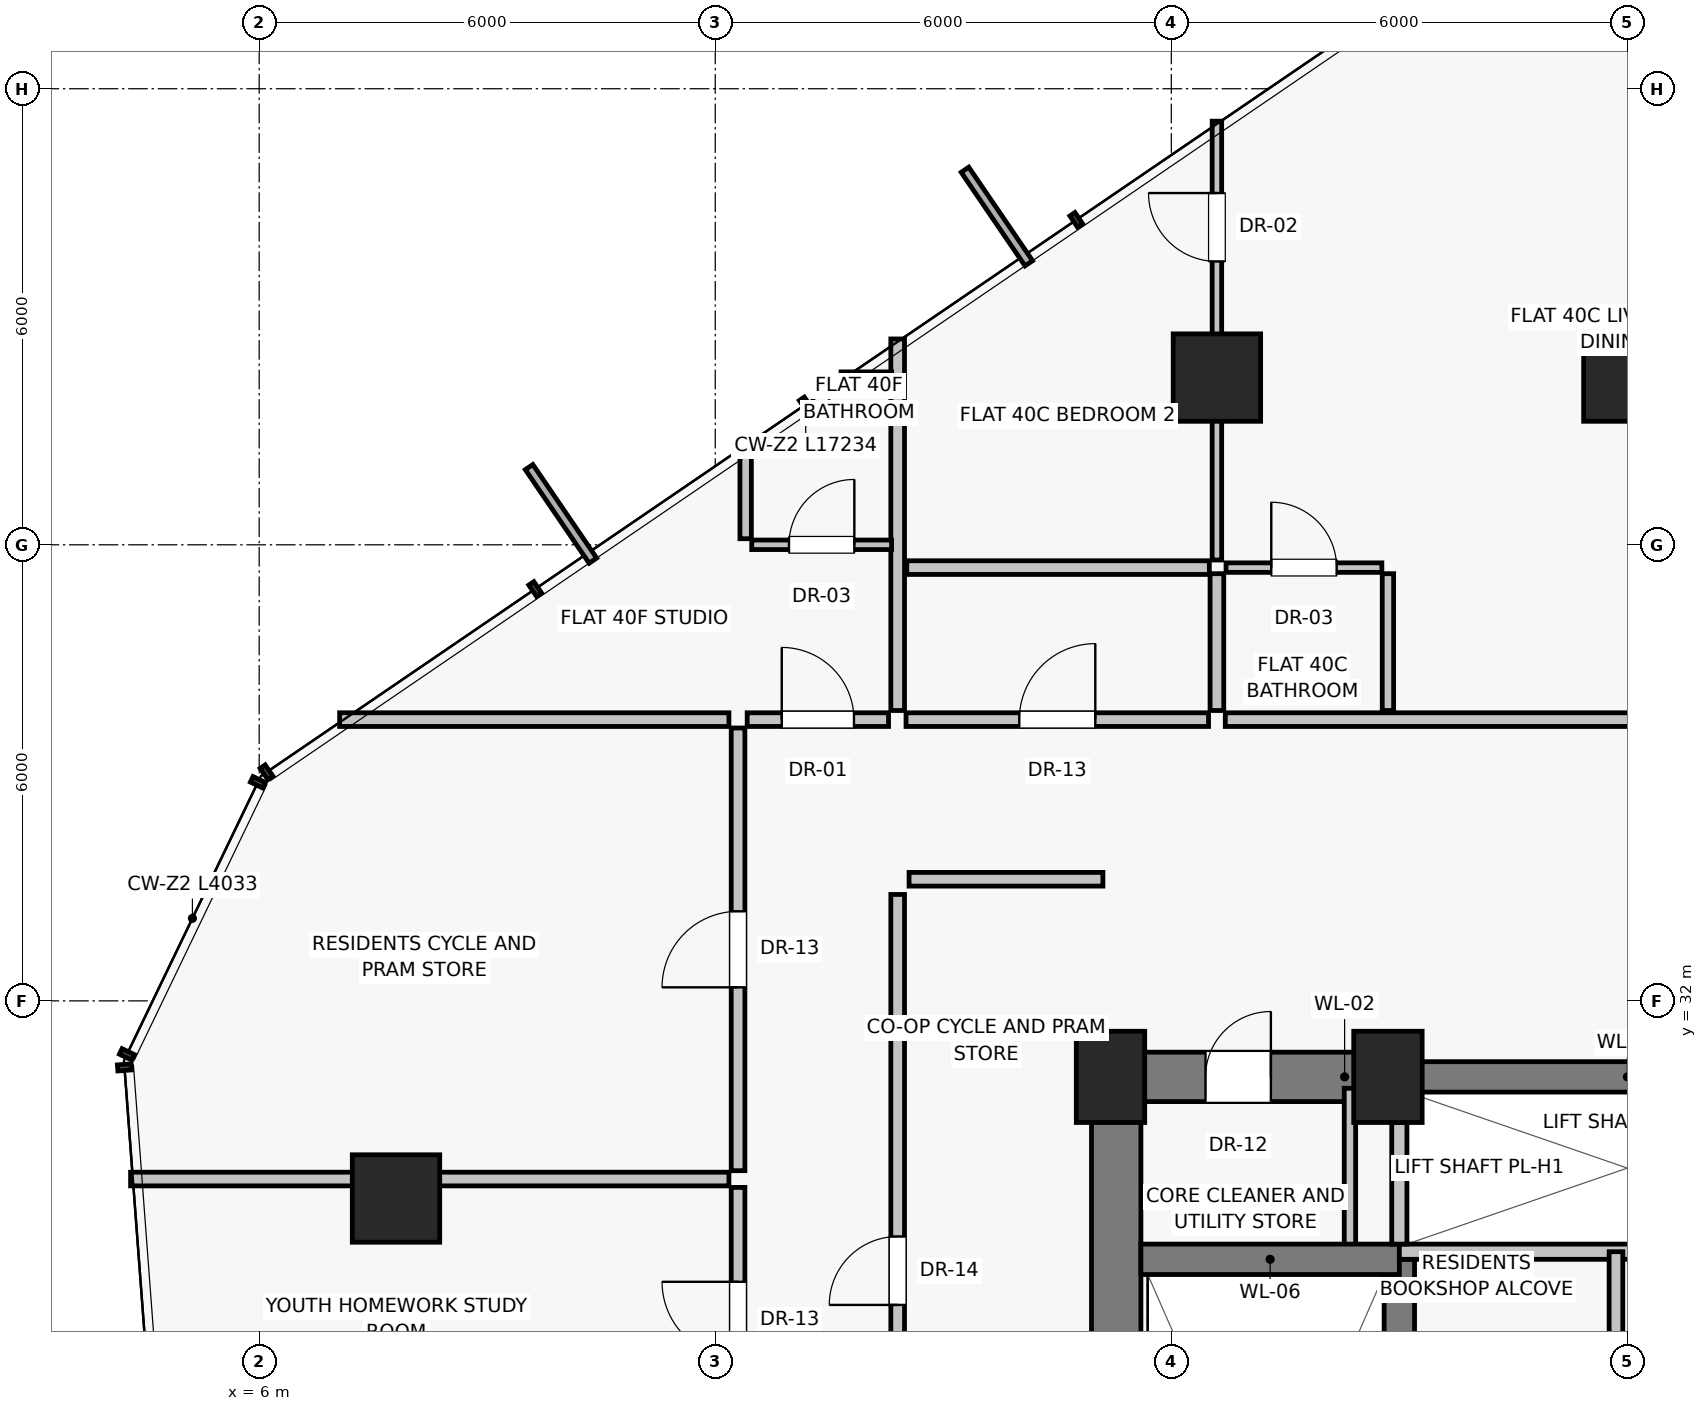
"""IFC4 building model, lengths in metres.
Left out: names, types, materials, properties, quantities, classifications, styles, units other than length and angle.
Written with IfcOpenShell. Run it as: python <this file> out.ifc"""

import sys

from ifc_helpers import new_model, si_unit, direction, frame, frame_2d, origin, origin_2d, place, context, subcontext, project, spatial, rectangle, extrude, source, transform, mapped, element, fill, save


model = new_model("IFC4")
c1 = context("Model", 3, precision=1e-05, world=origin(), true_north=direction((0.0, 1.0)))
c2 = subcontext(c1, "Body", "Model", "MODEL_VIEW")
j1 = project(units=[si_unit("LENGTHUNIT", "METRE"), si_unit("PLANEANGLEUNIT", "RADIAN")], contexts=[c1])
p1 = place(None, origin())
s1 = spatial("IfcSite", under=j1, at=p1, CompositionType="ELEMENT")
p2 = place(p1, origin())
s2 = spatial("IfcBuilding", under=s1, at=p2, CompositionType="ELEMENT")
p3 = place(p2, frame((0.0, 0.0, 142.5)))
s3 = spatial("IfcBuildingStorey", under=s2, at=p3, CompositionType="ELEMENT", Elevation=142.5)
for number, where, z_axis, x_axis in (
    (1, (17.2, 31.0, 0.0), (0.0, 0.0, 1.0), (1.0, 0.0, 0.0)),
    (2, (20.85, 31.0, 0.0), (0.0, 0.0, 1.0), (1.0, 0.0, 0.0)),
):
    element("IfcColumn", number, at=place(p3, frame(where, z_axis=z_axis, x_axis=x_axis)), inside=s3, PredefinedType="PILASTER", context=c2, shape_type="SweptSolid", body=[
        extrude(rectangle(XDim=0.9, YDim=1.2, at=origin_2d()), origin(), (0.0, 0.0, 1.0), 3.25),
    ])
for number, where, z_axis, x_axis in (
    (3, (24.0, 40.2, 0.0), (0.0, 0.0, 1.0), (1.0, 0.0, 0.0)),
    (4, (18.6, 40.2, 0.0), (0.0, 0.0, 1.0), (1.0, 0.0, 0.0)),
    (5, (7.8, 29.4, 0.0), (0.0, 0.0, 1.0), (1.0, 0.0, 0.0)),
):
    element("IfcColumn", number, at=place(p3, frame(where, z_axis=z_axis, x_axis=x_axis)), inside=s3, PredefinedType="COLUMN", context=c2, shape_type="SweptSolid", body=[
        extrude(rectangle(XDim=1.15, YDim=1.15, at=origin_2d()), origin(), (0.0, 0.0, 1.0), 3.25),
    ])
p4 = place(p3, frame((17.275, 16.8, 0.0), z_axis=(0.0, 0.0, 1.0), x_axis=(0.0, 1.0, 0.0)))
e6 = element("IfcWall", 6, at=p4, inside=s3, PredefinedType="SHEAR", context=c2, shape_type="SweptSolid", body=[
    extrude(rectangle(XDim=14.2, YDim=0.65, at=frame_2d((7.1, 0.0))), origin(), (0.0, 0.0, 1.0), 3.0),
])
p5 = place(p3, frame((17.2, 31.0, 0.0), z_axis=(0.0, 0.0, 1.0), x_axis=(1.0, 0.0, 0.0)))
e7 = element("IfcWall", 7, at=p5, inside=s3, PredefinedType="SHEAR", context=c2, shape_type="SweptSolid", body=[
    extrude(rectangle(XDim=3.8, YDim=0.65, at=frame_2d((1.9, 0.0))), origin(), (0.0, 0.0, 1.0), 3.0),
])
p6 = place(p5, frame((1.25, 0.0, 0.0)))
e8 = element("IfcOpeningElement", 8, at=p6, cuts=e7, PredefinedType="OPENING", context=c2, shape_type="SweptSolid", body=[
    extrude(rectangle(XDim=0.86, YDim=2.01, at=frame_2d((0.43, 1.005))), frame((0.0, 0.335, 0.0), z_axis=(0.0, -1.0, 0.0), x_axis=(1.0, 0.0, 0.0)), (0.0, 0.0, 1.0), 0.67),
])
p7 = place(p3, frame((21.0, 31.0, 0.0), z_axis=(0.0, 0.0, 1.0), x_axis=(1.0, 0.0, 0.0)))
e9 = element("IfcWall", 9, at=p7, inside=s3, PredefinedType="SHEAR", context=c2, shape_type="SweptSolid", body=[
    extrude(rectangle(XDim=6.0, YDim=0.4, at=frame_2d((3.0, 0.0))), origin(), (0.0, 0.0, 1.0), 3.0),
])
p8 = place(p3, frame((20.35, 28.65, 0.0), z_axis=(0.0, 0.0, 1.0), x_axis=(0.0, 1.0, 0.0)))
e10 = element("IfcWall", 10, at=p8, inside=s3, PredefinedType="PARTITIONING", context=c2, shape_type="SweptSolid", body=[
    extrude(rectangle(XDim=2.2, YDim=0.15, at=frame_2d((1.1, 0.0))), origin(), (0.0, 0.0, 1.0), 3.0),
])
p9 = place(p3, frame((21.0, 19.8, 0.0), z_axis=(0.0, 0.0, 1.0), x_axis=(0.0, 1.0, 0.0)))
e11 = element("IfcWall", 11, at=p9, inside=s3, PredefinedType="SHEAR", context=c2, shape_type="SweptSolid", body=[
    extrude(rectangle(XDim=8.8, YDim=0.4, at=frame_2d((4.4, 0.0))), origin(), (0.0, 0.0, 1.0), 3.0),
])
p10 = place(p3, frame((17.6, 28.6, 0.0), z_axis=(0.0, 0.0, 1.0), x_axis=(1.0, 0.0, 0.0)))
e12 = element("IfcWall", 12, at=p10, inside=s3, PredefinedType="SHEAR", context=c2, shape_type="SweptSolid", body=[
    extrude(rectangle(XDim=3.4, YDim=0.4, at=frame_2d((1.7, 0.0))), origin(), (0.0, 0.0, 1.0), 3.0),
])
p11 = place(p3, frame((21.0, 28.7, 0.0), z_axis=(0.0, 0.0, 1.0), x_axis=(1.0, 0.0, 0.0)))
e13 = element("IfcWall", 13, at=p11, inside=s3, PredefinedType="SOLIDWALL", context=c2, shape_type="SweptSolid", body=[
    extrude(rectangle(XDim=6.0, YDim=0.2, at=frame_2d((3.0, 0.0))), origin(), (0.0, 0.0, 1.0), 3.0),
])
p12 = place(p3, frame((21.0, 28.8, 0.0), z_axis=(0.0, 0.0, 1.0), x_axis=(0.0, 1.0, 0.0)))
e14 = element("IfcWall", 14, at=p12, inside=s3, PredefinedType="SOLIDWALL", context=c2, shape_type="SweptSolid", body=[
    extrude(rectangle(XDim=1.6, YDim=0.2, at=frame_2d((0.8, 0.0))), origin(), (0.0, 0.0, 1.0), 3.0),
])
p13 = place(p3, frame((23.85, 25.62, 0.0), z_axis=(0.0, 0.0, 1.0), x_axis=(0.0, 1.0, 0.0)))
e15 = element("IfcWall", 15, at=p13, inside=s3, PredefinedType="PARTITIONING", context=c2, shape_type="SweptSolid", body=[
    extrude(rectangle(XDim=3.08, YDim=0.18, at=frame_2d((1.54, 0.0))), origin(), (0.0, 0.0, 1.0), 3.0),
])
p14 = place(p13, frame((0.9, 0.0, 0.0)))
e16 = element("IfcOpeningElement", 16, at=p14, cuts=e15, PredefinedType="OPENING", context=c2, shape_type="SweptSolid", body=[
    extrude(rectangle(XDim=0.9, YDim=2.01, at=frame_2d((0.45, 1.005))), frame((0.0, 0.1, 0.0), z_axis=(0.0, -1.0, 0.0), x_axis=(1.0, 0.0, 0.0)), (0.0, 0.0, 1.0), 0.2),
])
p15 = place(p3, frame((14.4, 24.2, 0.0), z_axis=(0.0, 0.0, 1.0), x_axis=(0.0, 1.0, 0.0)))
e17 = element("IfcWall", 17, at=p15, inside=s3, PredefinedType="PARTITIONING", context=c2, shape_type="SweptSolid", body=[
    extrude(rectangle(XDim=9.2, YDim=0.18, at=frame_2d((4.6, 0.0))), origin(), (0.0, 0.0, 1.0), 3.0),
])
p16 = place(p15, frame((3.8, 0.0, 0.0)))
e18 = element("IfcOpeningElement", 18, at=p16, cuts=e17, PredefinedType="OPENING", context=c2, shape_type="SweptSolid", body=[
    extrude(rectangle(XDim=0.9, YDim=2.01, at=frame_2d((0.45, 1.005))), frame((0.0, 0.1, 0.0), z_axis=(0.0, -1.0, 0.0), x_axis=(1.0, 0.0, 0.0)), (0.0, 0.0, 1.0), 0.2),
])
p17 = place(p3, frame((14.55, 33.6, 0.0), z_axis=(0.0, 0.0, 1.0), x_axis=(1.0, 0.0, 0.0)))
e19 = element("IfcWall", 19, at=p17, inside=s3, PredefinedType="PARTITIONING", context=c2, shape_type="SweptSolid", body=[
    extrude(rectangle(XDim=2.55, YDim=0.18, at=frame_2d((1.275, 0.0))), origin(), (0.0, 0.0, 1.0), 3.0),
])
p18 = place(p3, frame((14.4, 35.82, 0.0), z_axis=(0.0, 0.0, 1.0), x_axis=(0.0, 1.0, 0.0)))
e20 = element("IfcWall", 20, at=p18, inside=s3, PredefinedType="PARTITIONING", context=c2, shape_type="SweptSolid", body=[
    extrude(rectangle(XDim=4.888, YDim=0.18, at=frame_2d((2.444, 0.0))), origin(), (0.0, 0.0, 1.0), 3.0),
])
p19 = place(p3, frame((14.51, 35.7, 0.0), z_axis=(0.0, 0.0, 1.0), x_axis=(1.0, 0.0, 0.0)))
e21 = element("IfcWall", 21, at=p19, inside=s3, PredefinedType="PARTITIONING", context=c2, shape_type="SweptSolid", body=[
    extrude(rectangle(XDim=3.98, YDim=0.18, at=frame_2d((1.99, 0.0))), origin(), (0.0, 0.0, 1.0), 2.58),
])
p20 = place(p19, frame((1.49, 0.0, 0.0)))
e22 = element("IfcOpeningElement", 22, at=p20, cuts=e21, PredefinedType="OPENING", context=c2, shape_type="SweptSolid", body=[
    extrude(rectangle(XDim=1.0, YDim=2.01, at=frame_2d((0.5, 1.005))), frame((0.0, 0.1, 0.0), z_axis=(0.0, -1.0, 0.0), x_axis=(1.0, 0.0, 0.0)), (0.0, 0.0, 1.0), 0.2),
])
p21 = place(p3, frame((18.71, 35.7, 0.0), z_axis=(0.0, 0.0, 1.0), x_axis=(1.0, 0.0, 0.0)))
e23 = element("IfcWall", 23, at=p21, inside=s3, PredefinedType="PARTITIONING", context=c2, shape_type="SweptSolid", body=[
    extrude(rectangle(XDim=14.78, YDim=0.18, at=frame_2d((7.39, 0.0))), origin(), (0.0, 0.0, 1.0), 2.58),
])
p22 = place(p21, frame((5.94, 0.0, 0.0)))
e24 = element("IfcOpeningElement", 24, at=p22, cuts=e23, PredefinedType="OPENING", context=c2, shape_type="SweptSolid", body=[
    extrude(rectangle(XDim=0.95, YDim=2.02, at=frame_2d((0.475, 1.01))), frame((0.0, 0.1, 0.0), z_axis=(0.0, -1.0, 0.0), x_axis=(1.0, 0.0, 0.0)), (0.0, 0.0, 1.0), 0.2),
])
p23 = place(p3, frame((14.52, 37.7, 0.0), z_axis=(0.0, 0.0, 1.0), x_axis=(1.0, 0.0, 0.0)))
e25 = element("IfcWall", 25, at=p23, inside=s3, PredefinedType="PARTITIONING", context=c2, shape_type="SweptSolid", body=[
    extrude(rectangle(XDim=3.98, YDim=0.18, at=frame_2d((1.99, 0.0))), origin(), (0.0, 0.0, 1.0), 3.0),
])
p24 = place(p3, frame((18.6, 35.82, 0.0), z_axis=(0.0, 0.0, 1.0), x_axis=(0.0, 1.0, 0.0)))
e26 = element("IfcWall", 26, at=p24, inside=s3, PredefinedType="PARTITIONING", context=c2, shape_type="SweptSolid", body=[
    extrude(rectangle(XDim=1.8, YDim=0.18, at=frame_2d((0.9, 0.0))), origin(), (0.0, 0.0, 1.0), 2.378),
])
p25 = place(p3, frame((18.6, 37.8, 0.0), z_axis=(0.0, 0.0, 1.0), x_axis=(0.0, 1.0, 0.0)))
e27 = element("IfcWall", 27, at=p25, inside=s3, PredefinedType="PARTITIONING", context=c2, shape_type="SweptSolid", body=[
    extrude(rectangle(XDim=5.773, YDim=0.125, at=frame_2d((2.887, 0.0))), origin(), (0.0, 0.0, 1.0), 2.378),
])
p26 = place(p25, frame((3.928, 0.0, 0.0)))
e28 = element("IfcOpeningElement", 28, at=p26, cuts=e27, PredefinedType="OPENING", context=c2, shape_type="SweptSolid", body=[
    extrude(rectangle(XDim=0.9, YDim=2.01, at=frame_2d((0.45, 1.005))), frame((0.0, 0.073, 0.0), z_axis=(0.0, -1.0, 0.0), x_axis=(1.0, 0.0, 0.0)), (0.0, 0.0, 1.0), 0.145),
])
p27 = place(p3, frame((20.85, 35.82, 0.0), z_axis=(0.0, 0.0, 1.0), x_axis=(0.0, 1.0, 0.0)))
e29 = element("IfcWall", 29, at=p27, inside=s3, PredefinedType="PARTITIONING", context=c2, shape_type="SweptSolid", body=[
    extrude(rectangle(XDim=1.8, YDim=0.15, at=frame_2d((0.9, 0.0))), origin(), (0.0, 0.0, 1.0), 3.0),
])
p28 = place(p3, frame((18.72, 37.7, 0.0), z_axis=(0.0, 0.0, 1.0), x_axis=(1.0, 0.0, 0.0)))
e30 = element("IfcWall", 30, at=p28, inside=s3, PredefinedType="PARTITIONING", context=c2, shape_type="SweptSolid", body=[
    extrude(rectangle(XDim=2.05, YDim=0.125, at=frame_2d((1.025, 0.0))), origin(), (0.0, 0.0, 1.0), 3.0),
])
p29 = place(p28, frame((0.595, 0.0, 0.0)))
e31 = element("IfcOpeningElement", 31, at=p29, cuts=e30, PredefinedType="OPENING", context=c2, shape_type="SweptSolid", body=[
    extrude(rectangle(XDim=0.86, YDim=2.01, at=frame_2d((0.43, 1.005))), frame((0.0, 0.073, 0.0), z_axis=(0.0, -1.0, 0.0), x_axis=(1.0, 0.0, 0.0)), (0.0, 0.0, 1.0), 0.145),
])
p30 = place(p3, frame((12.18, 35.7, 0.0), z_axis=(0.0, 0.0, 1.0), x_axis=(-1.0, 0.0, 0.0)))
e32 = element("IfcWall", 32, at=p30, inside=s3, PredefinedType="PARTITIONING", context=c2, shape_type="SweptSolid", body=[
    extrude(rectangle(XDim=5.122, YDim=0.18, at=frame_2d((2.561, 0.0))), origin(), (0.0, 0.0, 1.0), 3.0),
])
p31 = place(p3, frame((12.3, 26.062, 0.0), z_axis=(0.0, 0.0, 1.0), x_axis=(0.0, 1.0, 0.0)))
e33 = element("IfcWall", 33, at=p31, inside=s3, PredefinedType="PARTITIONING", context=c2, shape_type="SweptSolid", body=[
    extrude(rectangle(XDim=3.484, YDim=0.18, at=frame_2d((1.742, 0.0))), origin(), (0.0, 0.0, 1.0), 2.58),
])
p32 = place(p31, frame((1.242, 0.0, 0.0)))
e34 = element("IfcOpeningElement", 34, at=p32, cuts=e33, PredefinedType="OPENING", context=c2, shape_type="SweptSolid", body=[
    extrude(rectangle(XDim=1.0, YDim=2.01, at=frame_2d((0.5, 1.005))), frame((0.0, 0.1, 0.0), z_axis=(0.0, -1.0, 0.0), x_axis=(1.0, 0.0, 0.0)), (0.0, 0.0, 1.0), 0.2),
])
p33 = place(p3, frame((12.3, 29.766, 0.0), z_axis=(0.0, 0.0, 1.0), x_axis=(0.0, 1.0, 0.0)))
e35 = element("IfcWall", 35, at=p33, inside=s3, PredefinedType="PARTITIONING", context=c2, shape_type="SweptSolid", body=[
    extrude(rectangle(XDim=5.824, YDim=0.18, at=frame_2d((2.912, 0.0))), origin(), (0.0, 0.0, 1.0), 2.58),
])
p34 = place(p33, frame((2.412, 0.0, 0.0)))
e36 = element("IfcOpeningElement", 36, at=p34, cuts=e35, PredefinedType="OPENING", context=c2, shape_type="SweptSolid", body=[
    extrude(rectangle(XDim=1.0, YDim=2.01, at=frame_2d((0.5, 1.005))), frame((0.0, 0.1, 0.0), z_axis=(0.0, -1.0, 0.0), x_axis=(1.0, 0.0, 0.0)), (0.0, 0.0, 1.0), 0.2),
])
p35 = place(p3, frame((12.18, 29.656, 0.0), z_axis=(0.0, 0.0, 1.0), x_axis=(-1.0, 0.0, 0.0)))
e37 = element("IfcWall", 37, at=p35, inside=s3, PredefinedType="PARTITIONING", context=c2, shape_type="SweptSolid", body=[
    extrude(rectangle(XDim=7.872, YDim=0.18, at=frame_2d((3.936, 0.0))), origin(), (0.0, 0.0, 1.0), 2.378),
])
p36 = place(p3, frame((12.42, 35.7, 0.0), z_axis=(0.0, 0.0, 1.0), x_axis=(1.0, 0.0, 0.0)))
e38 = element("IfcWall", 38, at=p36, inside=s3, PredefinedType="PARTITIONING", context=c2, shape_type="SweptSolid", body=[
    extrude(rectangle(XDim=1.86, YDim=0.18, at=frame_2d((0.93, 0.0))), origin(), (0.0, 0.0, 1.0), 3.0),
])
p37 = place(p36, frame((0.455, 0.0, 0.0)))
e39 = element("IfcOpeningElement", 39, at=p37, cuts=e38, PredefinedType="OPENING", context=c2, shape_type="SweptSolid", body=[
    extrude(rectangle(XDim=0.95, YDim=2.02, at=frame_2d((0.475, 1.01))), frame((0.0, 0.1, 0.0), z_axis=(0.0, -1.0, 0.0), x_axis=(1.0, 0.0, 0.0)), (0.0, 0.0, 1.0), 0.2),
])
p38 = place(p3, frame((12.48, 38.0, 0.0), z_axis=(0.0, 0.0, 1.0), x_axis=(1.0, 0.0, 0.0)))
e40 = element("IfcWall", 40, at=p38, inside=s3, PredefinedType="PARTITIONING", context=c2, shape_type="SweptSolid", body=[
    extrude(rectangle(XDim=1.84, YDim=0.125, at=frame_2d((0.92, 0.0))), origin(), (0.0, 0.0, 1.0), 3.0),
])
p39 = place(p38, frame((0.49, 0.0, 0.0)))
e41 = element("IfcOpeningElement", 41, at=p39, cuts=e40, PredefinedType="OPENING", context=c2, shape_type="SweptSolid", body=[
    extrude(rectangle(XDim=0.86, YDim=2.01, at=frame_2d((0.43, 1.005))), frame((0.0, 0.073, 0.0), z_axis=(0.0, -1.0, 0.0), x_axis=(1.0, 0.0, 0.0)), (0.0, 0.0, 1.0), 0.145),
])
p40 = place(p3, frame((13.655, 40.2, 0.0), z_axis=(0.0, 0.0, 1.0), x_axis=(1.0, 0.0, 0.0)))
e42 = element("IfcWall", 42, at=p40, inside=s3, PredefinedType="PARTITIONING", context=c2, shape_type="SweptSolid", body=[
    extrude(rectangle(XDim=0.665, YDim=0.15, at=frame_2d((0.333, 0.0))), origin(), (0.0, 0.0, 1.0), 3.0),
])
p41 = place(p3, frame((12.4, 38.08, 0.0), z_axis=(0.0, 0.0, 1.0), x_axis=(0.0, 1.0, 0.0)))
e43 = element("IfcWall", 43, at=p41, inside=s3, PredefinedType="PARTITIONING", context=c2, shape_type="SweptSolid", body=[
    extrude(rectangle(XDim=1.264, YDim=0.15, at=frame_2d((0.632, 0.0))), origin(), (0.0, 0.0, 1.0), 3.0),
])
m1 = source(origin(), c2, "Body", "SweptSolid", [
    extrude(rectangle(XDim=0.86, YDim=2.01, at=frame_2d((0.43, 1.005))), frame((0.0, 0.025, 0.0), z_axis=(0.0, -1.0, 0.0), x_axis=(1.0, 0.0, 0.0)), (0.0, 0.0, 1.0), 0.05),
])
p42 = place(p6, origin())
e44 = element("IfcDoor", 44, at=p42, inside=s3, OperationType="SINGLE_SWING_RIGHT", PredefinedType="DOOR", context=c2, shape_type="MappedRepresentation", body=[
    mapped(m1, transform((0.0, 0.0, 0.0), scale=1.0)),
])
fill(e8, e44)
m2 = source(origin(), c2, "Body", "SweptSolid", [
    extrude(rectangle(XDim=0.9, YDim=2.01, at=frame_2d((0.45, 1.005))), frame((0.0, 0.025, 0.0), z_axis=(0.0, -1.0, 0.0), x_axis=(1.0, 0.0, 0.0)), (0.0, 0.0, 1.0), 0.05),
])
p43 = place(p16, origin())
e45 = element("IfcDoor", 45, at=p43, inside=s3, OperationType="SINGLE_SWING_LEFT", PredefinedType="DOOR", context=c2, shape_type="MappedRepresentation", body=[
    mapped(m2, transform((0.0, 0.0, 0.0), scale=1.0)),
])
fill(e18, e45)
m3 = source(origin(), c2, "Body", "SweptSolid", [
    extrude(rectangle(XDim=1.0, YDim=2.01, at=frame_2d((0.5, 1.005))), frame((0.0, 0.025, 0.0), z_axis=(0.0, -1.0, 0.0), x_axis=(1.0, 0.0, 0.0)), (0.0, 0.0, 1.0), 0.05),
])
p44 = place(p20, origin())
e46 = element("IfcDoor", 46, at=p44, inside=s3, OperationType="SINGLE_SWING_RIGHT", PredefinedType="DOOR", context=c2, shape_type="MappedRepresentation", body=[
    mapped(m3, transform((0.0, 0.0, 0.0), scale=1.0)),
])
fill(e22, e46)
p45 = place(p26, origin())
e47 = element("IfcDoor", 47, at=p45, inside=s3, OperationType="SINGLE_SWING_RIGHT", PredefinedType="DOOR", context=c2, shape_type="MappedRepresentation", body=[
    mapped(m2, transform((0.0, 0.0, 0.0), scale=1.0)),
])
fill(e28, e47)
p46 = place(p29, origin())
e48 = element("IfcDoor", 48, at=p46, inside=s3, OperationType="SINGLE_SWING_LEFT", PredefinedType="DOOR", context=c2, shape_type="MappedRepresentation", body=[
    mapped(m1, transform((0.0, 0.0, 0.0), scale=1.0)),
])
fill(e31, e48)
p47 = place(p32, origin())
e49 = element("IfcDoor", 49, at=p47, inside=s3, OperationType="SINGLE_SWING_RIGHT", PredefinedType="DOOR", context=c2, shape_type="MappedRepresentation", body=[
    mapped(m3, transform((0.0, 0.0, 0.0), scale=1.0)),
])
fill(e34, e49)
p48 = place(p34, origin())
e50 = element("IfcDoor", 50, at=p48, inside=s3, OperationType="SINGLE_SWING_LEFT", PredefinedType="DOOR", context=c2, shape_type="MappedRepresentation", body=[
    mapped(m3, transform((0.0, 0.0, 0.0), scale=1.0)),
])
fill(e36, e50)
m4 = source(origin(), c2, "Body", "SweptSolid", [
    extrude(rectangle(XDim=0.95, YDim=2.02, at=frame_2d((0.475, 1.01))), frame((0.0, 0.025, 0.0), z_axis=(0.0, -1.0, 0.0), x_axis=(1.0, 0.0, 0.0)), (0.0, 0.0, 1.0), 0.05),
])
p49 = place(p37, origin())
e51 = element("IfcDoor", 51, at=p49, inside=s3, OperationType="SINGLE_SWING_LEFT", PredefinedType="DOOR", context=c2, shape_type="MappedRepresentation", body=[
    mapped(m4, transform((0.0, 0.0, 0.0), scale=1.0)),
])
fill(e39, e51)
p50 = place(p39, origin())
e52 = element("IfcDoor", 52, at=p50, inside=s3, OperationType="SINGLE_SWING_RIGHT", PredefinedType="DOOR", context=c2, shape_type="MappedRepresentation", body=[
    mapped(m1, transform((0.0, 0.0, 0.0), scale=1.0)),
])
fill(e41, e52)
save(model, sys.argv[1])
